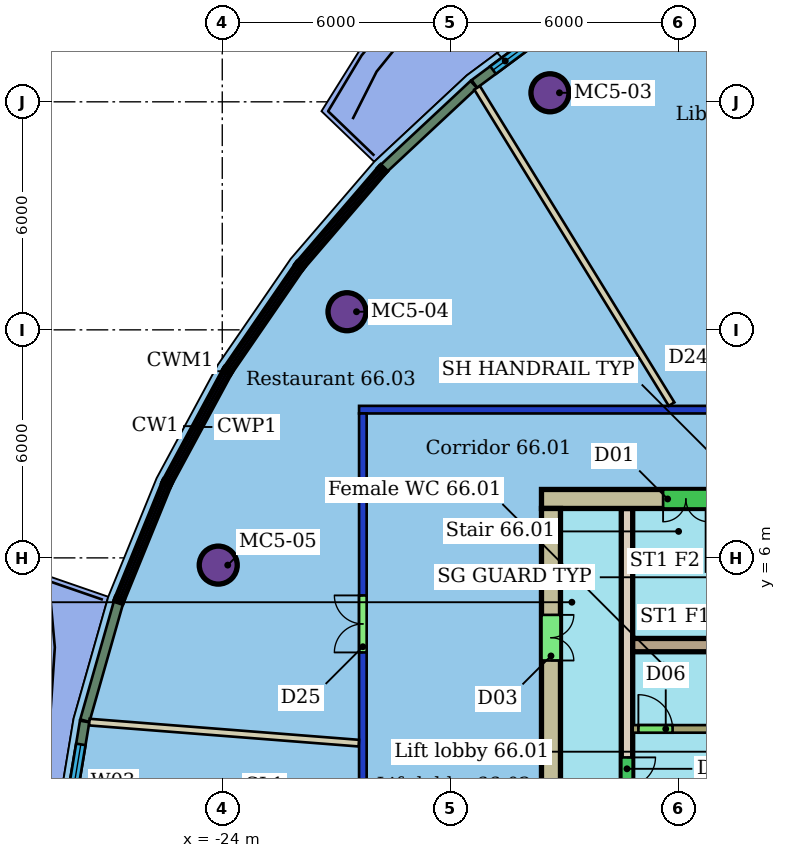
"""IFC4 building model, lengths in metres.
Left out: names, types, materials, properties, quantities, classifications, styles, units other than length and angle.
Written with IfcOpenShell. Run it as: python <this file> out.ifc"""

import sys

from ifc_helpers import new_model, si_unit, direction, frame, frame_2d, origin, origin_2d, place, context, subcontext, project, spatial, rectangle, hollow_circle, extrude, element, fill, save


model = new_model("IFC4")
c1 = context("Model", 3, precision=1e-05, world=origin(), true_north=direction((0.0, 1.0)))
c2 = subcontext(c1, "Body", "Model", "MODEL_VIEW")
j1 = project(units=[si_unit("LENGTHUNIT", "METRE"), si_unit("PLANEANGLEUNIT", "RADIAN")], contexts=[c1])
p1 = place(None, origin())
s1 = spatial("IfcSite", under=j1, at=p1, CompositionType="ELEMENT")
p2 = place(p1, origin())
s2 = spatial("IfcBuilding", under=s1, at=p2, CompositionType="ELEMENT")
p3 = place(p2, frame((0.0, 0.0, 268.5)))
s3 = spatial("IfcBuildingStorey", under=s2, at=p3, CompositionType="ELEMENT", Elevation=268.5)
for number, where, z_axis, x_axis in (
    (1, (-15.377, 18.238, 0.0), (0.0, 0.0, 1.0), (1.0, 0.0, 0.0)),
    (2, (-20.718, 12.477, 0.0), (0.0, 0.0, 1.0), (1.0, 0.0, 0.0)),
    (3, (-24.106, 5.81, 0.0), (0.0, 0.0, 1.0), (1.0, 0.0, 0.0)),
):
    element("IfcColumn", number, at=place(p3, frame(where, z_axis=z_axis, x_axis=x_axis)), inside=s3, PredefinedType="COLUMN", context=c2, shape_type="SweptSolid", body=[
        extrude(hollow_circle(Radius=0.5, WallThickness=0.04, at=origin_2d()), origin(), (0.0, 0.0, 1.0), 3.45),
    ])
p4 = place(p3, frame((-20.3, -9.8, 0.0), z_axis=(0.0, 0.0, 1.0), x_axis=(0.0, 1.0, 0.0)))
e4 = element("IfcWall", 4, at=p4, inside=s3, PredefinedType="PARTITIONING", context=c2, shape_type="SweptSolid", body=[
    extrude(rectangle(XDim=19.6, YDim=0.2, at=frame_2d((9.8, 0.0))), origin(), (0.0, 0.0, 1.0), 3.1),
])
p5 = place(p4, frame((13.312, 0.0, 0.0)))
e5 = element("IfcOpeningElement", 5, at=p5, cuts=e4, PredefinedType="OPENING", context=c2, shape_type="SweptSolid", body=[
    extrude(rectangle(XDim=1.5, YDim=2.4, at=frame_2d((0.75, 1.2))), frame((0.0, 0.11, 0.0), z_axis=(0.0, -1.0, 0.0), x_axis=(1.0, 0.0, 0.0)), (0.0, 0.0, 1.0), 0.22),
])
p6 = place(p4, frame((6.152, 0.0, 0.0)))
e6 = element("IfcOpeningElement", 6, at=p6, cuts=e4, PredefinedType="OPENING", context=c2, shape_type="SweptSolid", body=[
    extrude(rectangle(XDim=1.8, YDim=2.1, at=frame_2d((0.9, 1.05))), frame((0.0, 0.11, 0.0), z_axis=(0.0, -1.0, 0.0), x_axis=(1.0, 0.0, 0.0)), (0.0, 0.0, 1.0), 0.22),
])
p7 = place(p3, frame((-20.4, 9.9, 0.0), z_axis=(0.0, 0.0, 1.0), x_axis=(1.0, 0.0, 0.0)))
e7 = element("IfcWall", 7, at=p7, inside=s3, PredefinedType="PARTITIONING", context=c2, shape_type="SweptSolid", body=[
    extrude(rectangle(XDim=28.8, YDim=0.2, at=frame_2d((14.4, 0.0))), origin(), (0.0, 0.0, 1.0), 3.1),
])
p8 = place(p7, frame((16.82, 0.0, 0.0)))
e8 = element("IfcOpeningElement", 8, at=p8, cuts=e7, PredefinedType="OPENING", context=c2, shape_type="SweptSolid", body=[
    extrude(rectangle(XDim=1.5, YDim=2.4, at=frame_2d((0.75, 1.2))), frame((0.0, 0.11, 0.0), z_axis=(0.0, -1.0, 0.0), x_axis=(1.0, 0.0, 0.0)), (0.0, 0.0, 1.0), 0.22),
])
p9 = place(p7, frame((10.152, 0.0, 0.0)))
e9 = element("IfcOpeningElement", 9, at=p9, cuts=e7, PredefinedType="OPENING", context=c2, shape_type="SweptSolid", body=[
    extrude(rectangle(XDim=1.5, YDim=2.1, at=frame_2d((0.75, 1.05))), frame((0.0, 0.11, 0.0), z_axis=(0.0, -1.0, 0.0), x_axis=(1.0, 0.0, 0.0)), (0.0, 0.0, 1.0), 0.22),
])
p10 = place(p7, frame((21.021, 0.0, 0.0)))
e10 = element("IfcOpeningElement", 10, at=p10, cuts=e7, PredefinedType="OPENING", context=c2, shape_type="SweptSolid", body=[
    extrude(rectangle(XDim=1.5, YDim=2.1, at=frame_2d((0.75, 1.05))), frame((0.0, 0.11, 0.0), z_axis=(0.0, -1.0, 0.0), x_axis=(1.0, 0.0, 0.0)), (0.0, 0.0, 1.0), 0.22),
])
p11 = place(p3, frame((-17.294, 18.369, 0.0), z_axis=(0.0, 0.0, 1.0), x_axis=(0.523780906065, -0.851853016924, 0.0)))
e11 = element("IfcWall", 11, at=p11, inside=s3, PredefinedType="PARTITIONING", context=c2, shape_type="SweptSolid", body=[
    extrude(rectangle(XDim=9.77, YDim=0.175, at=frame_2d((4.885, 0.0))), origin(), (0.0, 0.0, 1.0), 3.45),
])
p12 = place(p3, frame((-27.498, 1.679, 0.0), z_axis=(0.0, 0.0, 1.0), x_axis=(0.996964972733, -0.077851417097, 0.0)))
e12 = element("IfcWall", 12, at=p12, inside=s3, PredefinedType="PARTITIONING", context=c2, shape_type="SweptSolid", body=[
    extrude(rectangle(XDim=7.112, YDim=0.175, at=frame_2d((3.556, 0.0))), origin(), (0.0, 0.0, 1.0), 3.45),
])
p13 = place(p3, frame((-14.777, 20.391, 0.0), z_axis=(0.0, 0.0, 1.0), x_axis=(-0.803243022616, -0.595651447256, 0.0)))
e13 = element("IfcWall", 13, at=p13, inside=s3, PredefinedType="SOLIDWALL", context=c2, shape_type="SweptSolid", body=[
    extrude(rectangle(XDim=3.222, YDim=0.25, at=frame_2d((1.611, 0.0))), origin(), (0.0, 0.0, 1.0), 3.15),
])
p14 = place(p13, frame((0.611, 0.0, 0.9)))
e14 = element("IfcOpeningElement", 14, at=p14, cuts=e13, PredefinedType="OPENING", context=c2, shape_type="SweptSolid", body=[
    extrude(rectangle(XDim=2.0, YDim=2.1, at=frame_2d((1.0, 1.05))), frame((0.0, 0.135, 0.0), z_axis=(0.0, -1.0, 0.0), x_axis=(1.0, 0.0, 0.0)), (0.0, 0.0, 1.0), 0.27),
])
for number, where, z_axis, x_axis in (
    (15, (-17.382, 18.457, 0.0), (0.0, 0.0, 1.0), (-0.731, -0.682, 0.0)),
    (16, (-26.731, 4.826, 0.0), (0.0, 0.0, 1.0), (-0.274, -0.962, 0.0)),
):
    element("IfcWall", number, at=place(p3, frame(where, z_axis=z_axis, x_axis=x_axis)), inside=s3, PredefinedType="SOLIDWALL", context=c2, shape_type="SweptSolid", body=[
        extrude(rectangle(XDim=3.232, YDim=0.25, at=frame_2d((1.616, 0.0))), origin(), (0.0, 0.0, 1.0), 3.15),
    ])
p15 = place(p3, frame((-27.621, 1.696, 0.0), z_axis=(0.0, 0.0, 1.0), x_axis=(-0.163956663746, -0.986467542504, 0.0)))
e17 = element("IfcWall", 17, at=p15, inside=s3, PredefinedType="SOLIDWALL", context=c2, shape_type="SweptSolid", body=[
    extrude(rectangle(XDim=3.222, YDim=0.25, at=frame_2d((1.611, 0.0))), origin(), (0.0, 0.0, 1.0), 3.15),
])
p16 = place(p15, frame((0.611, 0.0, 0.9)))
e18 = element("IfcOpeningElement", 18, at=p16, cuts=e17, PredefinedType="OPENING", context=c2, shape_type="SweptSolid", body=[
    extrude(rectangle(XDim=2.0, YDim=2.1, at=frame_2d((1.0, 1.05))), frame((0.0, 0.135, 0.0), z_axis=(0.0, -1.0, 0.0), x_axis=(1.0, 0.0, 0.0)), (0.0, 0.0, 1.0), 0.27),
])
p17 = place(p3, frame((-6.0, 7.55, 0.0), z_axis=(0.0, 0.0, 1.0), x_axis=(-1.0, 0.0, 0.0)))
e19 = element("IfcWall", 19, at=p17, inside=s3, PredefinedType="SHEAR", context=c2, shape_type="SweptSolid", body=[
    extrude(rectangle(XDim=9.6, YDim=0.5, at=frame_2d((4.8, 0.0))), origin(), (0.0, 0.0, 1.0), 3.3),
])
p18 = place(p17, frame((5.2, 0.0, 0.0)))
e20 = element("IfcOpeningElement", 20, at=p18, cuts=e19, PredefinedType="OPENING", context=c2, shape_type="SweptSolid", body=[
    extrude(rectangle(XDim=1.2, YDim=2.1, at=frame_2d((0.6, 1.05))), frame((0.0, 0.26, 0.0), z_axis=(0.0, -1.0, 0.0), x_axis=(1.0, 0.0, 0.0)), (0.0, 0.0, 1.0), 0.52),
])
p19 = place(p3, frame((-15.35, 7.3, 0.0), z_axis=(0.0, 0.0, 1.0), x_axis=(0.0, -1.0, 0.0)))
e21 = element("IfcWall", 21, at=p19, inside=s3, PredefinedType="SHEAR", context=c2, shape_type="SweptSolid", body=[
    extrude(rectangle(XDim=14.6, YDim=0.5, at=frame_2d((7.3, 0.0))), origin(), (0.0, 0.0, 1.0), 3.3),
])
p20 = place(p19, frame((10.6, 0.0, 0.0)))
e22 = element("IfcOpeningElement", 22, at=p20, cuts=e21, PredefinedType="OPENING", context=c2, shape_type="SweptSolid", body=[
    extrude(rectangle(XDim=1.2, YDim=2.1, at=frame_2d((0.6, 1.05))), frame((0.0, 0.26, 0.0), z_axis=(0.0, -1.0, 0.0), x_axis=(1.0, 0.0, 0.0)), (0.0, 0.0, 1.0), 0.52),
])
p21 = place(p19, frame((2.8, 0.0, 0.0)))
e23 = element("IfcOpeningElement", 23, at=p21, cuts=e21, PredefinedType="OPENING", context=c2, shape_type="SweptSolid", body=[
    extrude(rectangle(XDim=1.2, YDim=2.1, at=frame_2d((0.6, 1.05))), frame((0.0, 0.26, 0.0), z_axis=(0.0, -1.0, 0.0), x_axis=(1.0, 0.0, 0.0)), (0.0, 0.0, 1.0), 0.52),
])
p22 = place(p3, frame((-13.2, 3.705, 0.0), z_axis=(0.0, 0.0, 1.0), x_axis=(1.0, 0.0, 0.0)))
e24 = element("IfcWall", 24, at=p22, inside=s3, PredefinedType="SHEAR", context=c2, shape_type="SweptSolid", body=[
    extrude(rectangle(XDim=7.2, YDim=0.35, at=frame_2d((3.6, 0.0))), origin(), (0.0, 0.0, 1.0), 3.3),
])
p23 = place(p3, frame((-13.35, 7.3, 0.0), z_axis=(0.0, 0.0, 1.0), x_axis=(0.0, -1.0, 0.0)))
e25 = element("IfcWall", 25, at=p23, inside=s3, PredefinedType="SHEAR", context=c2, shape_type="SweptSolid", body=[
    extrude(rectangle(XDim=14.6, YDim=0.3, at=frame_2d((7.3, 0.0))), origin(), (0.0, 0.0, 1.0), 3.3),
])
p24 = place(p23, frame((6.55, 0.0, 0.0)))
e26 = element("IfcOpeningElement", 26, at=p24, cuts=e25, PredefinedType="OPENING", context=c2, shape_type="SweptSolid", body=[
    extrude(rectangle(XDim=1.5, YDim=2.1, at=frame_2d((0.75, 1.05))), frame((0.0, 0.16, 0.0), z_axis=(0.0, -1.0, 0.0), x_axis=(1.0, 0.0, 0.0)), (0.0, 0.0, 1.0), 0.32),
])
p25 = place(p3, frame((-13.2, 1.5, 0.0), z_axis=(0.0, 0.0, 1.0), x_axis=(1.0, 0.0, 0.0)))
e27 = element("IfcWall", 27, at=p25, inside=s3, PredefinedType="SHEAR", context=c2, shape_type="SweptSolid", body=[
    extrude(rectangle(XDim=14.4, YDim=0.2, at=frame_2d((7.2, 0.0))), origin(), (0.0, 0.0, 1.0), 3.3),
])
p26 = place(p25, frame((10.312, 0.0, 0.0)))
e28 = element("IfcOpeningElement", 28, at=p26, cuts=e27, PredefinedType="OPENING", context=c2, shape_type="SweptSolid", body=[
    extrude(rectangle(XDim=1.1, YDim=2.1, at=frame_2d((0.55, 1.05))), frame((0.0, 0.11, 0.0), z_axis=(0.0, -1.0, 0.0), x_axis=(1.0, 0.0, 0.0)), (0.0, 0.0, 1.0), 0.22),
])
p27 = place(p25, frame((12.754, 0.0, 0.0)))
e29 = element("IfcOpeningElement", 29, at=p27, cuts=e27, PredefinedType="OPENING", context=c2, shape_type="SweptSolid", body=[
    extrude(rectangle(XDim=1.1, YDim=2.1, at=frame_2d((0.55, 1.05))), frame((0.0, 0.11, 0.0), z_axis=(0.0, -1.0, 0.0), x_axis=(1.0, 0.0, 0.0)), (0.0, 0.0, 1.0), 0.22),
])
p28 = place(p25, frame((0.15, 0.0, 0.0)))
e30 = element("IfcOpeningElement", 30, at=p28, cuts=e27, PredefinedType="OPENING", context=c2, shape_type="SweptSolid", body=[
    extrude(rectangle(XDim=0.9, YDim=2.1, at=frame_2d((0.45, 1.05))), frame((0.0, 0.11, 0.0), z_axis=(0.0, -1.0, 0.0), x_axis=(1.0, 0.0, 0.0)), (0.0, 0.0, 1.0), 0.22),
])
p29 = place(p25, frame((4.983, 0.0, 0.0)))
e31 = element("IfcOpeningElement", 31, at=p29, cuts=e27, PredefinedType="OPENING", context=c2, shape_type="SweptSolid", body=[
    extrude(rectangle(XDim=0.9, YDim=2.1, at=frame_2d((0.45, 1.05))), frame((0.0, 0.11, 0.0), z_axis=(0.0, -1.0, 0.0), x_axis=(1.0, 0.0, 0.0)), (0.0, 0.0, 1.0), 0.22),
])
p30 = place(p5, origin())
e32 = element("IfcDoor", 32, at=p30, inside=s3, OperationType="DOUBLE_DOOR_SINGLE_SWING", PredefinedType="DOOR", context=c2, shape_type="SweptSolid", body=[
    extrude(rectangle(XDim=1.5, YDim=2.4, at=frame_2d((0.75, 1.2))), frame((0.0, 0.025, 0.0), z_axis=(0.0, -1.0, 0.0), x_axis=(1.0, 0.0, 0.0)), (0.0, 0.0, 1.0), 0.05),
])
fill(e5, e32)
p31 = place(p14, origin())
e33 = element("IfcWindow", 33, at=p31, inside=s3, PartitioningType="SINGLE_PANEL", PredefinedType="WINDOW", context=c2, shape_type="SweptSolid", body=[
    extrude(rectangle(XDim=2.0, YDim=2.1, at=frame_2d((1.0, 1.05))), frame((0.0, 0.03, 0.0), z_axis=(0.0, -1.0, 0.0), x_axis=(1.0, 0.0, 0.0)), (0.0, 0.0, 1.0), 0.06),
])
fill(e14, e33)
p32 = place(p16, origin())
e34 = element("IfcWindow", 34, at=p32, inside=s3, PartitioningType="SINGLE_PANEL", PredefinedType="WINDOW", context=c2, shape_type="SweptSolid", body=[
    extrude(rectangle(XDim=2.0, YDim=2.1, at=frame_2d((1.0, 1.05))), frame((0.0, 0.03, 0.0), z_axis=(0.0, -1.0, 0.0), x_axis=(1.0, 0.0, 0.0)), (0.0, 0.0, 1.0), 0.06),
])
fill(e18, e34)
p33 = place(p18, origin())
e35 = element("IfcDoor", 35, at=p33, inside=s3, OperationType="DOUBLE_DOOR_SINGLE_SWING", PredefinedType="NOTDEFINED", context=c2, shape_type="SweptSolid", body=[
    extrude(rectangle(XDim=1.2, YDim=2.1, at=frame_2d((0.6, 1.05))), frame((0.0, 0.025, 0.0), z_axis=(0.0, -1.0, 0.0), x_axis=(1.0, 0.0, 0.0)), (0.0, 0.0, 1.0), 0.05),
])
fill(e20, e35)
p34 = place(p21, origin())
e36 = element("IfcDoor", 36, at=p34, inside=s3, OperationType="DOUBLE_DOOR_SINGLE_SWING", PredefinedType="NOTDEFINED", context=c2, shape_type="SweptSolid", body=[
    extrude(rectangle(XDim=1.2, YDim=2.1, at=frame_2d((0.6, 1.05))), frame((0.0, 0.025, 0.0), z_axis=(0.0, -1.0, 0.0), x_axis=(1.0, 0.0, 0.0)), (0.0, 0.0, 1.0), 0.05),
])
fill(e23, e36)
p35 = place(p24, origin())
e37 = element("IfcDoor", 37, at=p35, inside=s3, OperationType="DOUBLE_DOOR_SINGLE_SWING", PredefinedType="NOTDEFINED", context=c2, shape_type="SweptSolid", body=[
    extrude(rectangle(XDim=1.5, YDim=2.1, at=frame_2d((0.75, 1.05))), frame((0.0, 0.025, 0.0), z_axis=(0.0, -1.0, 0.0), x_axis=(1.0, 0.0, 0.0)), (0.0, 0.0, 1.0), 0.05),
])
fill(e26, e37)
p36 = place(p28, origin())
e38 = element("IfcDoor", 38, at=p36, inside=s3, OperationType="SINGLE_SWING_LEFT", PredefinedType="NOTDEFINED", context=c2, shape_type="SweptSolid", body=[
    extrude(rectangle(XDim=0.9, YDim=2.1, at=frame_2d((0.45, 1.05))), frame((0.0, 0.025, 0.0), z_axis=(0.0, -1.0, 0.0), x_axis=(1.0, 0.0, 0.0)), (0.0, 0.0, 1.0), 0.05),
])
fill(e30, e38)
save(model, sys.argv[1])
